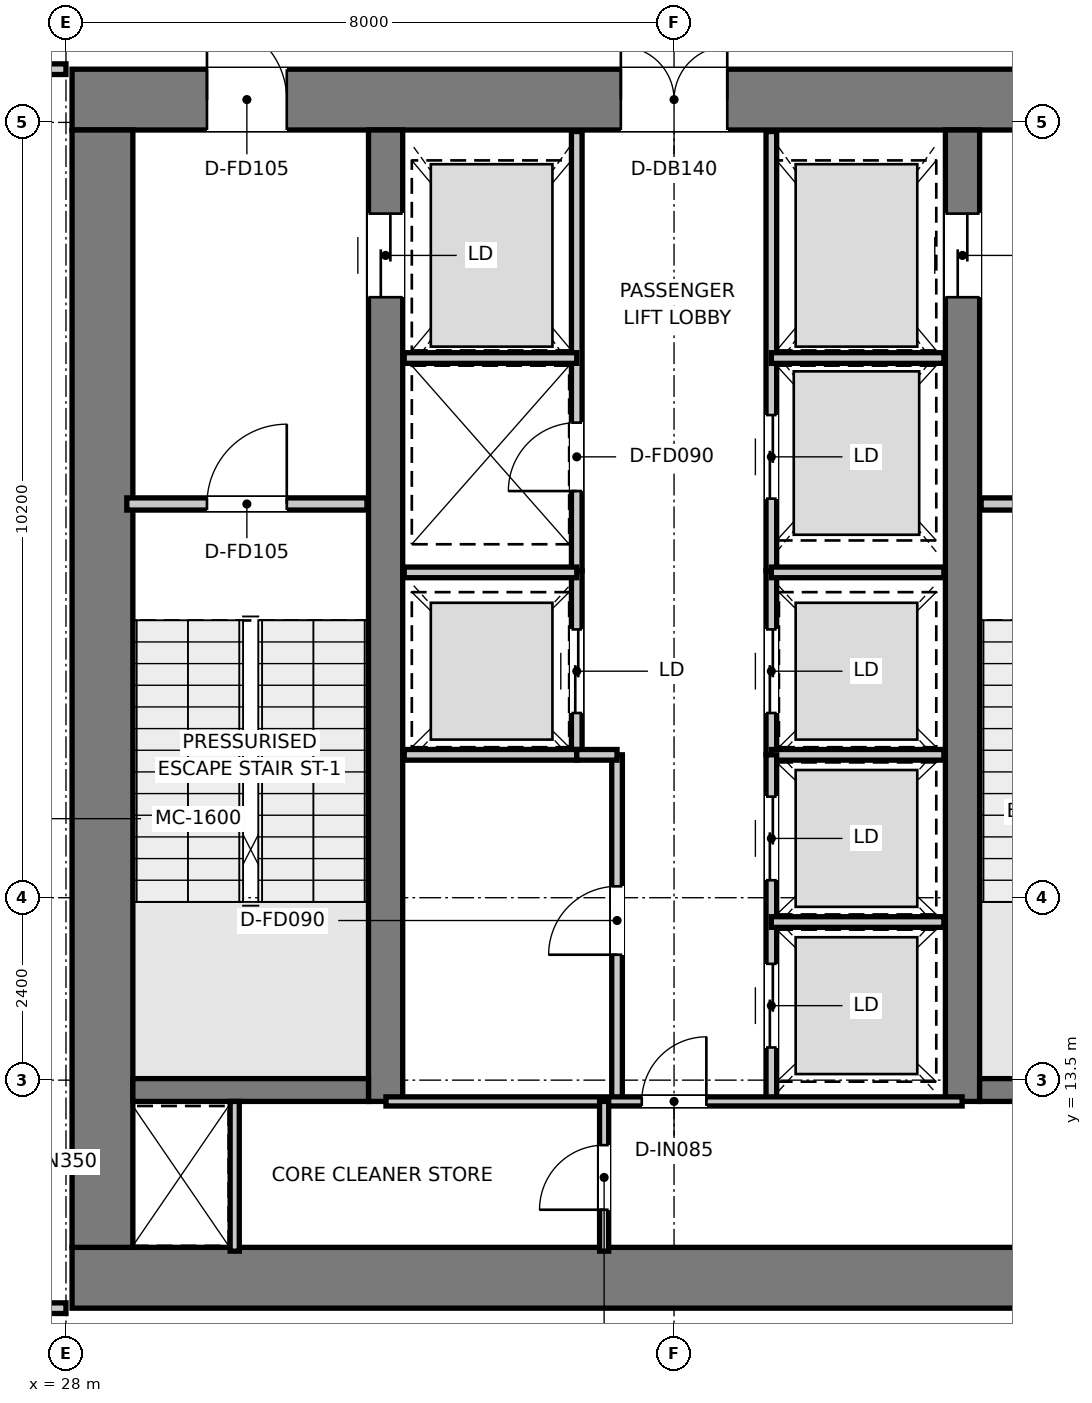
"""IFC4 building model, lengths in metres.
Left out: names, types, materials, properties, quantities, classifications, styles, units other than length and angle.
Written with IfcOpenShell. Run it as: python <this file> out.ifc"""

import sys

from ifc_helpers import new_model, si_unit, direction, frame, frame_2d, origin, place, context, subcontext, project, spatial, rectangle, extrude, element, fill, save


model = new_model("IFC4")
c1 = context("Model", 3, precision=1e-05, world=origin(), true_north=direction((0.0, 1.0)))
c2 = subcontext(c1, "Body", "Model", "MODEL_VIEW")
j1 = project(units=[si_unit("LENGTHUNIT", "METRE"), si_unit("PLANEANGLEUNIT", "RADIAN")], contexts=[c1])
p1 = place(None, origin())
s1 = spatial("IfcSite", under=j1, at=p1, CompositionType="ELEMENT")
p2 = place(p1, origin())
s2 = spatial("IfcBuilding", under=s1, at=p2, CompositionType="ELEMENT")
p3 = place(p2, frame((0.0, 0.0, 262.6)))
s3 = spatial("IfcBuildingStorey", under=s2, at=p3, CompositionType="ELEMENT", Elevation=262.6)
p4 = place(p3, frame((28.08, 10.9, 0.0), z_axis=(0.0, 0.0, 1.0), x_axis=(1.0, 0.0, 0.0)))
e1 = element("IfcWall", 1, at=p4, inside=s3, PredefinedType="SHEAR", context=c2, shape_type="SweptSolid", body=[
    extrude(rectangle(XDim=15.84, YDim=0.8, at=frame_2d((7.92, 0.0))), origin(), (0.0, 0.0, 1.0), 4.8),
])
p5 = place(p3, frame((28.08, 26.4, 0.0), z_axis=(0.0, 0.0, 1.0), x_axis=(1.0, 0.0, 0.0)))
e2 = element("IfcWall", 2, at=p5, inside=s3, PredefinedType="SHEAR", context=c2, shape_type="SweptSolid", body=[
    extrude(rectangle(XDim=15.84, YDim=0.8, at=frame_2d((7.92, 0.0))), origin(), (0.0, 0.0, 1.0), 4.8),
])
p6 = place(p5, frame((7.22, 0.0, 0.0)))
e3 = element("IfcOpeningElement", 3, at=p6, cuts=e2, PredefinedType="OPENING", context=c2, shape_type="SweptSolid", body=[
    extrude(rectangle(XDim=1.4, YDim=2.2, at=frame_2d((0.7, 1.1))), frame((0.0, 0.41, 0.0), z_axis=(0.0, -1.0, 0.0), x_axis=(1.0, 0.0, 0.0)), (0.0, 0.0, 1.0), 0.82),
])
p7 = place(p5, frame((1.775, 0.0, 0.0)))
e4 = element("IfcOpeningElement", 4, at=p7, cuts=e2, PredefinedType="OPENING", context=c2, shape_type="SweptSolid", body=[
    extrude(rectangle(XDim=1.05, YDim=2.1, at=frame_2d((0.525, 1.05))), frame((0.0, 0.41, 0.0), z_axis=(0.0, -1.0, 0.0), x_axis=(1.0, 0.0, 0.0)), (0.0, 0.0, 1.0), 0.82),
])
p8 = place(p5, frame((13.015, 0.0, 0.0)))
e5 = element("IfcOpeningElement", 5, at=p8, cuts=e2, PredefinedType="OPENING", context=c2, shape_type="SweptSolid", body=[
    extrude(rectangle(XDim=1.05, YDim=2.1, at=frame_2d((0.525, 1.05))), frame((0.0, 0.41, 0.0), z_axis=(0.0, -1.0, 0.0), x_axis=(1.0, 0.0, 0.0)), (0.0, 0.0, 1.0), 0.82),
])
p9 = place(p3, frame((28.48, 11.3, 0.0), z_axis=(0.0, 0.0, 1.0), x_axis=(0.0, 1.0, 0.0)))
e6 = element("IfcWall", 6, at=p9, inside=s3, PredefinedType="SHEAR", context=c2, shape_type="SweptSolid", body=[
    extrude(rectangle(XDim=14.7, YDim=0.8, at=frame_2d((7.35, 0.0))), origin(), (0.0, 0.0, 1.0), 4.8),
])
p10 = place(p3, frame((32.205, 13.22, 0.0), z_axis=(0.0, 0.0, 1.0), x_axis=(0.0, 1.0, 0.0)))
e7 = element("IfcWall", 7, at=p10, inside=s3, PredefinedType="SHEAR", context=c2, shape_type="SweptSolid", body=[
    extrude(rectangle(XDim=12.78, YDim=0.45, at=frame_2d((6.39, 0.0))), origin(), (0.0, 0.0, 1.0), 4.8),
])
p11 = place(p10, frame((10.58, 0.0, 0.0)))
e8 = element("IfcOpeningElement", 8, at=p11, cuts=e7, PredefinedType="OPENING", context=c2, shape_type="SweptSolid", body=[
    extrude(rectangle(XDim=1.1, YDim=2.15, at=frame_2d((0.55, 1.075))), frame((0.0, 0.235, 0.0), z_axis=(0.0, -1.0, 0.0), x_axis=(1.0, 0.0, 0.0)), (0.0, 0.0, 1.0), 0.47),
])
p12 = place(p3, frame((39.795, 13.22, 0.0), z_axis=(0.0, 0.0, 1.0), x_axis=(0.0, 1.0, 0.0)))
e9 = element("IfcWall", 9, at=p12, inside=s3, PredefinedType="SHEAR", context=c2, shape_type="SweptSolid", body=[
    extrude(rectangle(XDim=12.78, YDim=0.45, at=frame_2d((6.39, 0.0))), origin(), (0.0, 0.0, 1.0), 4.8),
])
p13 = place(p12, frame((10.58, 0.0, 0.0)))
e10 = element("IfcOpeningElement", 10, at=p13, cuts=e9, PredefinedType="OPENING", context=c2, shape_type="SweptSolid", body=[
    extrude(rectangle(XDim=1.1, YDim=2.15, at=frame_2d((0.55, 1.075))), frame((0.0, 0.235, 0.0), z_axis=(0.0, -1.0, 0.0), x_axis=(1.0, 0.0, 0.0)), (0.0, 0.0, 1.0), 0.47),
])
for number, where, z_axis, x_axis in (
    (11, (28.88, 13.37, 0.0), (0.0, 0.0, 1.0), (1.0, 0.0, 0.0)),
    (12, (40.02, 13.37, 0.0), (0.0, 0.0, 1.0), (1.0, 0.0, 0.0)),
):
    element("IfcWall", number, at=place(p3, frame(where, z_axis=z_axis, x_axis=x_axis)), inside=s3, PredefinedType="SHEAR", context=c2, shape_type="SweptSolid", body=[
        extrude(rectangle(XDim=3.1, YDim=0.3, at=frame_2d((1.55, 0.0))), origin(), (0.0, 0.0, 1.0), 4.8),
    ])
p14 = place(p3, frame((28.8, 21.08, 0.0), z_axis=(0.0, 0.0, 1.0), x_axis=(1.0, 0.0, 0.0)))
e13 = element("IfcWall", 13, at=p14, inside=s3, PredefinedType="PARTITIONING", context=c2, shape_type="SweptSolid", body=[
    extrude(rectangle(XDim=3.16, YDim=0.16, at=frame_2d((1.58, 0.0))), origin(), (0.0, 0.0, 1.0), 4.52),
])
p15 = place(p14, frame((1.055, 0.0, 0.0)))
e14 = element("IfcOpeningElement", 14, at=p15, cuts=e13, PredefinedType="OPENING", context=c2, shape_type="SweptSolid", body=[
    extrude(rectangle(XDim=1.05, YDim=2.1, at=frame_2d((0.525, 1.05))), frame((0.0, 0.09, 0.0), z_axis=(0.0, -1.0, 0.0), x_axis=(1.0, 0.0, 0.0)), (0.0, 0.0, 1.0), 0.18),
])
p16 = place(p3, frame((40.04, 21.08, 0.0), z_axis=(0.0, 0.0, 1.0), x_axis=(1.0, 0.0, 0.0)))
e15 = element("IfcWall", 15, at=p16, inside=s3, PredefinedType="PARTITIONING", context=c2, shape_type="SweptSolid", body=[
    extrude(rectangle(XDim=3.16, YDim=0.16, at=frame_2d((1.58, 0.0))), origin(), (0.0, 0.0, 1.0), 4.52),
])
p17 = place(p16, frame((1.055, 0.0, 0.0)))
e16 = element("IfcOpeningElement", 16, at=p17, cuts=e15, PredefinedType="OPENING", context=c2, shape_type="SweptSolid", body=[
    extrude(rectangle(XDim=1.05, YDim=2.1, at=frame_2d((0.525, 1.05))), frame((0.0, 0.09, 0.0), z_axis=(0.0, -1.0, 0.0), x_axis=(1.0, 0.0, 0.0)), (0.0, 0.0, 1.0), 0.18),
])
p18 = place(p3, frame((34.72, 20.2, 0.0), z_axis=(0.0, 0.0, 1.0), x_axis=(0.0, 1.0, 0.0)))
e17 = element("IfcWall", 17, at=p18, inside=s3, PredefinedType="PARTITIONING", context=c2, shape_type="SweptSolid", body=[
    extrude(rectangle(XDim=5.78, YDim=0.14, at=frame_2d((2.89, 0.0))), origin(), (0.0, 0.0, 1.0), 3.67),
])
p19 = place(p18, frame((1.05, 0.0, 0.0)))
e18 = element("IfcOpeningElement", 18, at=p19, cuts=e17, PredefinedType="OPENING", context=c2, shape_type="SweptSolid", body=[
    extrude(rectangle(XDim=0.9, YDim=2.1, at=frame_2d((0.45, 1.05))), frame((0.0, 0.08, 0.0), z_axis=(0.0, -1.0, 0.0), x_axis=(1.0, 0.0, 0.0)), (0.0, 0.0, 1.0), 0.16),
])
p20 = place(p3, frame((37.28, 20.2, 0.0), z_axis=(0.0, 0.0, 1.0), x_axis=(0.0, 1.0, 0.0)))
e19 = element("IfcWall", 19, at=p20, inside=s3, PredefinedType="PARTITIONING", context=c2, shape_type="SweptSolid", body=[
    extrude(rectangle(XDim=5.78, YDim=0.14, at=frame_2d((2.89, 0.0))), origin(), (0.0, 0.0, 1.0), 3.67),
])
p21 = place(p20, frame((0.95, 0.0, 0.0)))
e20 = element("IfcOpeningElement", 20, at=p21, cuts=e19, PredefinedType="OPENING", context=c2, shape_type="SweptSolid", body=[
    extrude(rectangle(XDim=1.1, YDim=2.15, at=frame_2d((0.55, 1.075))), frame((0.0, 0.08, 0.0), z_axis=(0.0, -1.0, 0.0), x_axis=(1.0, 0.0, 0.0)), (0.0, 0.0, 1.0), 0.16),
])
for number, where, z_axis, x_axis in (
    (21, (32.45, 23.0, 0.0), (0.0, 0.0, 1.0), (1.0, 0.0, 0.0)),
    (22, (37.28, 23.0, 0.0), (0.0, 0.0, 1.0), (1.0, 0.0, 0.0)),
):
    element("IfcWall", number, at=place(p3, frame(where, z_axis=z_axis, x_axis=x_axis)), inside=s3, PredefinedType="PARTITIONING", context=c2, shape_type="SweptSolid", body=[
        extrude(rectangle(XDim=2.27, YDim=0.14, at=frame_2d((1.135, 0.0))), origin(), (0.0, 0.0, 1.0), 3.67),
    ])
p22 = place(p3, frame((34.72, 17.78, 0.0), z_axis=(0.0, 0.0, 1.0), x_axis=(0.0, 1.0, 0.0)))
e23 = element("IfcWall", 23, at=p22, inside=s3, PredefinedType="PARTITIONING", context=c2, shape_type="SweptSolid", body=[
    extrude(rectangle(XDim=2.42, YDim=0.14, at=frame_2d((1.21, 0.0))), origin(), (0.0, 0.0, 1.0), 4.52),
])
p23 = place(p22, frame((0.55, 0.0, 0.0)))
e24 = element("IfcOpeningElement", 24, at=p23, cuts=e23, PredefinedType="OPENING", context=c2, shape_type="SweptSolid", body=[
    extrude(rectangle(XDim=1.1, YDim=2.15, at=frame_2d((0.55, 1.075))), frame((0.0, 0.08, 0.0), z_axis=(0.0, -1.0, 0.0), x_axis=(1.0, 0.0, 0.0)), (0.0, 0.0, 1.0), 0.16),
])
p24 = place(p3, frame((37.28, 17.78, 0.0), z_axis=(0.0, 0.0, 1.0), x_axis=(0.0, 1.0, 0.0)))
e25 = element("IfcWall", 25, at=p24, inside=s3, PredefinedType="PARTITIONING", context=c2, shape_type="SweptSolid", body=[
    extrude(rectangle(XDim=2.42, YDim=0.14, at=frame_2d((1.21, 0.0))), origin(), (0.0, 0.0, 1.0), 4.52),
])
p25 = place(p24, frame((0.55, 0.0, 0.0)))
e26 = element("IfcOpeningElement", 26, at=p25, cuts=e25, PredefinedType="OPENING", context=c2, shape_type="SweptSolid", body=[
    extrude(rectangle(XDim=1.1, YDim=2.15, at=frame_2d((0.55, 1.075))), frame((0.0, 0.08, 0.0), z_axis=(0.0, -1.0, 0.0), x_axis=(1.0, 0.0, 0.0)), (0.0, 0.0, 1.0), 0.16),
])
for number, where, z_axis, x_axis in (
    (27, (32.45, 17.78, 0.0), (0.0, 0.0, 1.0), (1.0, 0.0, 0.0)),
    (28, (32.45, 20.18, 0.0), (0.0, 0.0, 1.0), (1.0, 0.0, 0.0)),
    (29, (37.28, 17.78, 0.0), (0.0, 0.0, 1.0), (1.0, 0.0, 0.0)),
    (30, (37.28, 20.18, 0.0), (0.0, 0.0, 1.0), (1.0, 0.0, 0.0)),
):
    element("IfcWall", number, at=place(p3, frame(where, z_axis=z_axis, x_axis=x_axis)), inside=s3, PredefinedType="PARTITIONING", context=c2, shape_type="SweptSolid", body=[
        extrude(rectangle(XDim=2.27, YDim=0.14, at=frame_2d((1.135, 0.0))), origin(), (0.0, 0.0, 1.0), 4.52),
    ])
p26 = place(p3, frame((35.25, 13.22, 0.0), z_axis=(0.0, 0.0, 1.0), x_axis=(0.0, 1.0, 0.0)))
e31 = element("IfcWall", 31, at=p26, inside=s3, PredefinedType="PARTITIONING", context=c2, shape_type="SweptSolid", body=[
    extrude(rectangle(XDim=4.56, YDim=0.14, at=frame_2d((2.28, 0.0))), origin(), (0.0, 0.0, 1.0), 4.52),
])
p27 = place(p26, frame((1.93, 0.0, 0.0)))
e32 = element("IfcOpeningElement", 32, at=p27, cuts=e31, PredefinedType="OPENING", context=c2, shape_type="SweptSolid", body=[
    extrude(rectangle(XDim=0.9, YDim=2.1, at=frame_2d((0.45, 1.05))), frame((0.0, 0.08, 0.0), z_axis=(0.0, -1.0, 0.0), x_axis=(1.0, 0.0, 0.0)), (0.0, 0.0, 1.0), 0.16),
])
p28 = place(p3, frame((34.72, 17.78, 0.0), z_axis=(0.0, 0.0, 1.0), x_axis=(1.0, 0.0, 0.0)))
e33 = element("IfcWall", 33, at=p28, inside=s3, PredefinedType="PARTITIONING", context=c2, shape_type="SweptSolid", body=[
    extrude(rectangle(XDim=0.53, YDim=0.14, at=frame_2d((0.265, 0.0))), origin(), (0.0, 0.0, 1.0), 4.52),
])
p29 = place(p3, frame((37.28, 13.22, 0.0), z_axis=(0.0, 0.0, 1.0), x_axis=(0.0, 1.0, 0.0)))
e34 = element("IfcWall", 34, at=p29, inside=s3, PredefinedType="PARTITIONING", context=c2, shape_type="SweptSolid", body=[
    extrude(rectangle(XDim=4.56, YDim=0.14, at=frame_2d((2.28, 0.0))), origin(), (0.0, 0.0, 1.0), 4.52),
])
p30 = place(p29, frame((0.71, 0.0, 0.0)))
e35 = element("IfcOpeningElement", 35, at=p30, cuts=e34, PredefinedType="OPENING", context=c2, shape_type="SweptSolid", body=[
    extrude(rectangle(XDim=1.1, YDim=2.15, at=frame_2d((0.55, 1.075))), frame((0.0, 0.08, 0.0), z_axis=(0.0, -1.0, 0.0), x_axis=(1.0, 0.0, 0.0)), (0.0, 0.0, 1.0), 0.16),
])
p31 = place(p29, frame((2.91, 0.0, 0.0)))
e36 = element("IfcOpeningElement", 36, at=p31, cuts=e34, PredefinedType="OPENING", context=c2, shape_type="SweptSolid", body=[
    extrude(rectangle(XDim=1.1, YDim=2.15, at=frame_2d((0.55, 1.075))), frame((0.0, 0.08, 0.0), z_axis=(0.0, -1.0, 0.0), x_axis=(1.0, 0.0, 0.0)), (0.0, 0.0, 1.0), 0.16),
])
p32 = place(p3, frame((37.28, 15.58, 0.0), z_axis=(0.0, 0.0, 1.0), x_axis=(1.0, 0.0, 0.0)))
e37 = element("IfcWall", 37, at=p32, inside=s3, PredefinedType="PARTITIONING", context=c2, shape_type="SweptSolid", body=[
    extrude(rectangle(XDim=2.27, YDim=0.14, at=frame_2d((1.135, 0.0))), origin(), (0.0, 0.0, 1.0), 4.52),
])
p33 = place(p3, frame((30.22, 11.25, 0.0), z_axis=(0.0, 0.0, 1.0), x_axis=(0.0, 1.0, 0.0)))
e38 = element("IfcWall", 38, at=p33, inside=s3, PredefinedType="PARTITIONING", context=c2, shape_type="SweptSolid", body=[
    extrude(rectangle(XDim=1.97, YDim=0.12, at=frame_2d((0.985, 0.0))), origin(), (0.0, 0.0, 1.0), 4.52),
])
p34 = place(p3, frame((32.21, 13.22, 0.0), z_axis=(0.0, 0.0, 1.0), x_axis=(1.0, 0.0, 0.0)))
e39 = element("IfcWall", 39, at=p34, inside=s3, PredefinedType="PARTITIONING", context=c2, shape_type="SweptSolid", body=[
    extrude(rectangle(XDim=7.58, YDim=0.12, at=frame_2d((3.79, 0.0))), origin(), (0.0, 0.0, 1.0), 4.52),
])
p35 = place(p34, frame((3.365, 0.0, 0.0)))
e40 = element("IfcOpeningElement", 40, at=p35, cuts=e39, PredefinedType="OPENING", context=c2, shape_type="SweptSolid", body=[
    extrude(rectangle(XDim=0.85, YDim=2.1, at=frame_2d((0.425, 1.05))), frame((0.0, 0.07, 0.0), z_axis=(0.0, -1.0, 0.0), x_axis=(1.0, 0.0, 0.0)), (0.0, 0.0, 1.0), 0.14),
])
p36 = place(p3, frame((35.08, 11.25, 0.0), z_axis=(0.0, 0.0, 1.0), x_axis=(0.0, 1.0, 0.0)))
e41 = element("IfcWall", 41, at=p36, inside=s3, PredefinedType="PARTITIONING", context=c2, shape_type="SweptSolid", body=[
    extrude(rectangle(XDim=1.97, YDim=0.12, at=frame_2d((0.985, 0.0))), origin(), (0.0, 0.0, 1.0), 4.52),
])
p37 = place(p36, frame((0.545, 0.0, 0.0)))
e42 = element("IfcOpeningElement", 42, at=p37, cuts=e41, PredefinedType="OPENING", context=c2, shape_type="SweptSolid", body=[
    extrude(rectangle(XDim=0.85, YDim=2.1, at=frame_2d((0.425, 1.05))), frame((0.0, 0.07, 0.0), z_axis=(0.0, -1.0, 0.0), x_axis=(1.0, 0.0, 0.0)), (0.0, 0.0, 1.0), 0.14),
])
p38 = place(p3, frame((26.32, 26.8, 0.0), z_axis=(0.0, 0.0, 1.0), x_axis=(1.0, 0.0, 0.0)))
e43 = element("IfcWall", 43, at=p38, inside=s3, PredefinedType="PARTITIONING", context=c2, shape_type="SweptSolid", body=[
    extrude(rectangle(XDim=1.68, YDim=0.14, at=frame_2d((0.84, 0.0))), origin(), (0.0, 0.0, 1.0), 4.03),
])
p39 = place(p38, frame((0.445, 0.0, 0.0)))
e44 = element("IfcOpeningElement", 44, at=p39, cuts=e43, PredefinedType="OPENING", context=c2, shape_type="SweptSolid", body=[
    extrude(rectangle(XDim=0.85, YDim=2.1, at=frame_2d((0.425, 1.05))), frame((0.0, 0.08, 0.0), z_axis=(0.0, -1.0, 0.0), x_axis=(1.0, 0.0, 0.0)), (0.0, 0.0, 1.0), 0.16),
])
p40 = place(p3, frame((26.32, 10.5, 0.0), z_axis=(0.0, 0.0, 1.0), x_axis=(1.0, 0.0, 0.0)))
e45 = element("IfcWall", 45, at=p40, inside=s3, PredefinedType="PARTITIONING", context=c2, shape_type="SweptSolid", body=[
    extrude(rectangle(XDim=1.68, YDim=0.14, at=frame_2d((0.84, 0.0))), origin(), (0.0, 0.0, 1.0), 4.52),
])
p41 = place(p15, origin())
e46 = element("IfcDoor", 46, at=p41, inside=s3, OperationType="SINGLE_SWING_RIGHT", PredefinedType="DOOR", context=c2, shape_type="SweptSolid", body=[
    extrude(rectangle(XDim=1.05, YDim=2.1, at=frame_2d((0.525, 1.05))), frame((0.0, 0.025, 0.0), z_axis=(0.0, -1.0, 0.0), x_axis=(1.0, 0.0, 0.0)), (0.0, 0.0, 1.0), 0.05),
])
fill(e14, e46)
p42 = place(p6, origin())
e47 = element("IfcDoor", 47, at=p42, inside=s3, OperationType="DOUBLE_DOOR_SINGLE_SWING", PredefinedType="DOOR", context=c2, shape_type="SweptSolid", body=[
    extrude(rectangle(XDim=1.4, YDim=2.2, at=frame_2d((0.7, 1.1))), frame((0.0, 0.025, 0.0), z_axis=(0.0, -1.0, 0.0), x_axis=(1.0, 0.0, 0.0)), (0.0, 0.0, 1.0), 0.05),
])
fill(e3, e47)
p43 = place(p7, origin())
e48 = element("IfcDoor", 48, at=p43, inside=s3, OperationType="SINGLE_SWING_LEFT", PredefinedType="DOOR", context=c2, shape_type="SweptSolid", body=[
    extrude(rectangle(XDim=1.05, YDim=2.1, at=frame_2d((0.525, 1.05))), frame((0.0, 0.025, 0.0), z_axis=(0.0, -1.0, 0.0), x_axis=(1.0, 0.0, 0.0)), (0.0, 0.0, 1.0), 0.05),
])
fill(e4, e48)
p44 = place(p11, origin())
e49 = element("IfcDoor", 49, at=p44, inside=s3, OperationType="DOUBLE_DOOR_SLIDING", PredefinedType="DOOR", context=c2, shape_type="SweptSolid", body=[
    extrude(rectangle(XDim=1.1, YDim=2.15, at=frame_2d((0.55, 1.075))), frame((0.0, 0.025, 0.0), z_axis=(0.0, -1.0, 0.0), x_axis=(1.0, 0.0, 0.0)), (0.0, 0.0, 1.0), 0.05),
])
fill(e8, e49)
p45 = place(p13, origin())
e50 = element("IfcDoor", 50, at=p45, inside=s3, OperationType="DOUBLE_DOOR_SLIDING", PredefinedType="DOOR", context=c2, shape_type="SweptSolid", body=[
    extrude(rectangle(XDim=1.1, YDim=2.15, at=frame_2d((0.55, 1.075))), frame((0.0, 0.025, 0.0), z_axis=(0.0, -1.0, 0.0), x_axis=(1.0, 0.0, 0.0)), (0.0, 0.0, 1.0), 0.05),
])
fill(e10, e50)
p46 = place(p19, origin())
e51 = element("IfcDoor", 51, at=p46, inside=s3, OperationType="SINGLE_SWING_LEFT", PredefinedType="DOOR", context=c2, shape_type="SweptSolid", body=[
    extrude(rectangle(XDim=0.9, YDim=2.1, at=frame_2d((0.45, 1.05))), frame((0.0, 0.025, 0.0), z_axis=(0.0, -1.0, 0.0), x_axis=(1.0, 0.0, 0.0)), (0.0, 0.0, 1.0), 0.05),
])
fill(e18, e51)
p47 = place(p21, origin())
e52 = element("IfcDoor", 52, at=p47, inside=s3, OperationType="DOUBLE_DOOR_SLIDING", PredefinedType="DOOR", context=c2, shape_type="SweptSolid", body=[
    extrude(rectangle(XDim=1.1, YDim=2.15, at=frame_2d((0.55, 1.075))), frame((0.0, 0.025, 0.0), z_axis=(0.0, -1.0, 0.0), x_axis=(1.0, 0.0, 0.0)), (0.0, 0.0, 1.0), 0.05),
])
fill(e20, e52)
p48 = place(p23, origin())
e53 = element("IfcDoor", 53, at=p48, inside=s3, OperationType="DOUBLE_DOOR_SLIDING", PredefinedType="DOOR", context=c2, shape_type="SweptSolid", body=[
    extrude(rectangle(XDim=1.1, YDim=2.15, at=frame_2d((0.55, 1.075))), frame((0.0, 0.025, 0.0), z_axis=(0.0, -1.0, 0.0), x_axis=(1.0, 0.0, 0.0)), (0.0, 0.0, 1.0), 0.05),
])
fill(e24, e53)
p49 = place(p25, origin())
e54 = element("IfcDoor", 54, at=p49, inside=s3, OperationType="DOUBLE_DOOR_SLIDING", PredefinedType="DOOR", context=c2, shape_type="SweptSolid", body=[
    extrude(rectangle(XDim=1.1, YDim=2.15, at=frame_2d((0.55, 1.075))), frame((0.0, 0.025, 0.0), z_axis=(0.0, -1.0, 0.0), x_axis=(1.0, 0.0, 0.0)), (0.0, 0.0, 1.0), 0.05),
])
fill(e26, e54)
p50 = place(p27, origin())
e55 = element("IfcDoor", 55, at=p50, inside=s3, OperationType="SINGLE_SWING_LEFT", PredefinedType="DOOR", context=c2, shape_type="SweptSolid", body=[
    extrude(rectangle(XDim=0.9, YDim=2.1, at=frame_2d((0.45, 1.05))), frame((0.0, 0.025, 0.0), z_axis=(0.0, -1.0, 0.0), x_axis=(1.0, 0.0, 0.0)), (0.0, 0.0, 1.0), 0.05),
])
fill(e32, e55)
p51 = place(p30, origin())
e56 = element("IfcDoor", 56, at=p51, inside=s3, OperationType="DOUBLE_DOOR_SLIDING", PredefinedType="DOOR", context=c2, shape_type="SweptSolid", body=[
    extrude(rectangle(XDim=1.1, YDim=2.15, at=frame_2d((0.55, 1.075))), frame((0.0, 0.025, 0.0), z_axis=(0.0, -1.0, 0.0), x_axis=(1.0, 0.0, 0.0)), (0.0, 0.0, 1.0), 0.05),
])
fill(e35, e56)
p52 = place(p31, origin())
e57 = element("IfcDoor", 57, at=p52, inside=s3, OperationType="DOUBLE_DOOR_SLIDING", PredefinedType="DOOR", context=c2, shape_type="SweptSolid", body=[
    extrude(rectangle(XDim=1.1, YDim=2.15, at=frame_2d((0.55, 1.075))), frame((0.0, 0.025, 0.0), z_axis=(0.0, -1.0, 0.0), x_axis=(1.0, 0.0, 0.0)), (0.0, 0.0, 1.0), 0.05),
])
fill(e36, e57)
p53 = place(p35, origin())
e58 = element("IfcDoor", 58, at=p53, inside=s3, OperationType="SINGLE_SWING_RIGHT", PredefinedType="DOOR", context=c2, shape_type="SweptSolid", body=[
    extrude(rectangle(XDim=0.85, YDim=2.1, at=frame_2d((0.425, 1.05))), frame((0.0, 0.025, 0.0), z_axis=(0.0, -1.0, 0.0), x_axis=(1.0, 0.0, 0.0)), (0.0, 0.0, 1.0), 0.05),
])
fill(e40, e58)
p54 = place(p37, origin())
e59 = element("IfcDoor", 59, at=p54, inside=s3, OperationType="SINGLE_SWING_LEFT", PredefinedType="DOOR", context=c2, shape_type="SweptSolid", body=[
    extrude(rectangle(XDim=0.85, YDim=2.1, at=frame_2d((0.425, 1.05))), frame((0.0, 0.025, 0.0), z_axis=(0.0, -1.0, 0.0), x_axis=(1.0, 0.0, 0.0)), (0.0, 0.0, 1.0), 0.05),
])
fill(e42, e59)
save(model, sys.argv[1])
